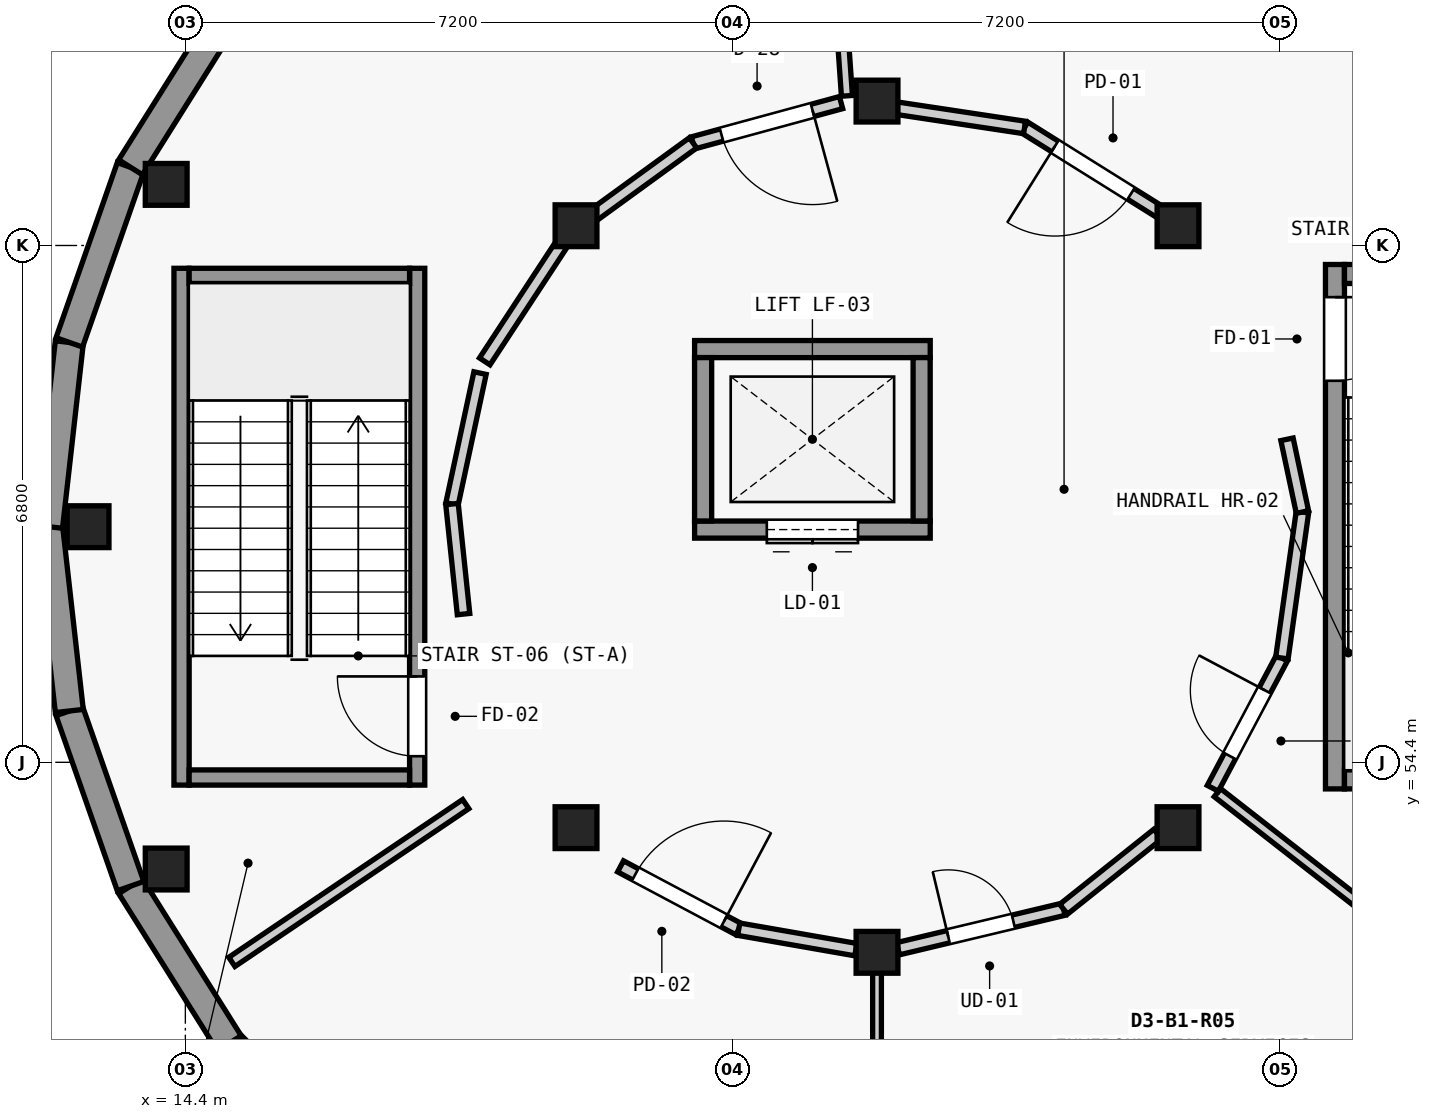
"""IFC4 building model, lengths in metres.
Left out: names, types, materials, properties, quantities, classifications, styles, units other than length and angle.
Written with IfcOpenShell. Run it as: python <this file> out.ifc"""

import sys

from ifc_helpers import new_model, si_unit, direction, frame, frame_2d, origin, origin_2d, place, context, subcontext, project, spatial, rectangle, extrude, element, fill, save


model = new_model("IFC4")
c1 = context("Model", 3, precision=1e-05, world=origin(), true_north=direction((0.0, 1.0)))
c2 = subcontext(c1, "Body", "Model", "MODEL_VIEW")
j1 = project(units=[si_unit("LENGTHUNIT", "METRE"), si_unit("PLANEANGLEUNIT", "RADIAN")], contexts=[c1])
p1 = place(None, origin())
s1 = spatial("IfcSite", under=j1, at=p1, CompositionType="ELEMENT")
p2 = place(p1, origin())
s2 = spatial("IfcBuilding", under=s1, at=p2, CompositionType="ELEMENT")
p3 = place(p2, frame((0.0, 0.0, -4.55)))
s3 = spatial("IfcBuildingStorey", under=s2, at=p3, CompositionType="ELEMENT", Elevation=-4.55)
for number, where, z_axis, x_axis in (
    (1, (14.148, 62.004, 0.0), (0.0, 0.0, 1.0), (1.0, 0.0, 0.0)),
    (2, (13.12, 57.5, 0.0), (0.0, 0.0, 1.0), (1.0, 0.0, 0.0)),
    (3, (14.148, 52.996, 0.0), (0.0, 0.0, 1.0), (1.0, 0.0, 0.0)),
    (4, (27.46, 61.46, 0.0), (0.0, 0.0, 1.0), (1.0, 0.0, 0.0)),
    (5, (23.5, 63.1, 0.0), (0.0, 0.0, 1.0), (1.0, 0.0, 0.0)),
    (6, (19.54, 61.46, 0.0), (0.0, 0.0, 1.0), (1.0, 0.0, 0.0)),
    (7, (19.54, 53.54, 0.0), (0.0, 0.0, 1.0), (1.0, 0.0, 0.0)),
    (8, (23.5, 51.9, 0.0), (0.0, 0.0, 1.0), (1.0, 0.0, 0.0)),
    (9, (27.46, 53.54, 0.0), (0.0, 0.0, 1.0), (1.0, 0.0, 0.0)),
):
    element("IfcColumn", number, at=place(p3, frame(where, z_axis=z_axis, x_axis=x_axis)), inside=s3, PredefinedType="COLUMN", context=c2, shape_type="SweptSolid", body=[
        extrude(rectangle(XDim=0.55, YDim=0.55, at=origin_2d()), origin(), (0.0, 0.0, 1.0), 4.55),
    ])
p4 = place(p3, frame((16.704, 48.978, 0.0), z_axis=(0.0, 0.0, 1.0), x_axis=(-0.707106781187, 0.707106781187, 0.0)))
e10 = element("IfcWall", 10, at=p4, inside=s3, PredefinedType="USERDEFINED", context=c2, shape_type="SweptSolid", body=[
    extrude(rectangle(XDim=2.441, YDim=0.37, at=frame_2d((1.22, 0.0))), origin(), (0.0, 0.0, 1.0), 3.335),
])
p5 = place(p3, frame((14.978, 50.704, 0.0), z_axis=(0.0, 0.0, 1.0), x_axis=(-0.532136726684, 0.846658434148, 0.0)))
e11 = element("IfcWall", 11, at=p5, inside=s3, PredefinedType="USERDEFINED", context=c2, shape_type="SweptSolid", body=[
    extrude(rectangle(XDim=2.441, YDim=0.37, at=frame_2d((1.221, 0.0))), origin(), (0.0, 0.0, 1.0), 3.335),
])
p6 = place(p3, frame((13.679, 52.771, 0.0), z_axis=(0.0, 0.0, 1.0), x_axis=(-0.330176659411, 0.943919156274, 0.0)))
e12 = element("IfcWall", 12, at=p6, inside=s3, PredefinedType="USERDEFINED", context=c2, shape_type="SweptSolid", body=[
    extrude(rectangle(XDim=2.441, YDim=0.37, at=frame_2d((1.22, 0.0))), origin(), (0.0, 0.0, 1.0), 3.335),
])
for number, where, z_axis, x_axis in (
    (13, (12.873, 55.075, 0.0), (0.0, 0.0, 1.0), (-0.112, 0.994, 0.0)),
    (14, (12.6, 57.5, 0.0), (0.0, 0.0, 1.0), (0.112, 0.994, 0.0)),
):
    element("IfcWall", number, at=place(p3, frame(where, z_axis=z_axis, x_axis=x_axis)), inside=s3, PredefinedType="USERDEFINED", context=c2, shape_type="SweptSolid", body=[
        extrude(rectangle(XDim=2.44, YDim=0.37, at=frame_2d((1.22, 0.0))), origin(), (0.0, 0.0, 1.0), 3.335),
    ])
p7 = place(p3, frame((12.873, 59.925, 0.0), z_axis=(0.0, 0.0, 1.0), x_axis=(0.330176659411, 0.943919156274, 0.0)))
e15 = element("IfcWall", 15, at=p7, inside=s3, PredefinedType="USERDEFINED", context=c2, shape_type="SweptSolid", body=[
    extrude(rectangle(XDim=2.441, YDim=0.37, at=frame_2d((1.22, 0.0))), origin(), (0.0, 0.0, 1.0), 3.335),
])
p8 = place(p3, frame((13.679, 62.229, 0.0), z_axis=(0.0, 0.0, 1.0), x_axis=(0.532136726684, 0.846658434148, 0.0)))
e16 = element("IfcWall", 16, at=p8, inside=s3, PredefinedType="USERDEFINED", context=c2, shape_type="SweptSolid", body=[
    extrude(rectangle(XDim=2.441, YDim=0.37, at=frame_2d((1.221, 0.0))), origin(), (0.0, 0.0, 1.0), 3.335),
])
p9 = place(p3, frame((29.525, 60.95, 0.0), z_axis=(0.0, 0.0, 1.0), x_axis=(0.0, -1.0, 0.0)))
e17 = element("IfcWall", 17, at=p9, inside=s3, PredefinedType="SHEAR", context=c2, shape_type="SweptSolid", body=[
    extrude(rectangle(XDim=6.9, YDim=0.25, at=frame_2d((3.45, 0.0))), origin(), (0.0, 0.0, 1.0), 4.135),
])
p10 = place(p9, frame((0.43, 0.0, 0.0)))
e18 = element("IfcOpeningElement", 18, at=p10, cuts=e17, PredefinedType="OPENING", context=c2, shape_type="SweptSolid", body=[
    extrude(rectangle(XDim=1.1, YDim=2.15, at=frame_2d((0.55, 1.075))), frame((0.0, 0.135, 0.0), z_axis=(0.0, -1.0, 0.0), x_axis=(1.0, 0.0, 0.0)), (0.0, 0.0, 1.0), 0.27),
])
for number, where, z_axis, x_axis in (
    (19, (29.65, 60.825, 0.0), (0.0, 0.0, 1.0), (1.0, 0.0, 0.0)),
    (20, (29.65, 54.175, 0.0), (0.0, 0.0, 1.0), (1.0, 0.0, 0.0)),
):
    element("IfcWall", number, at=place(p3, frame(where, z_axis=z_axis, x_axis=x_axis)), inside=s3, PredefinedType="SHEAR", context=c2, shape_type="SweptSolid", body=[
        extrude(rectangle(XDim=2.9, YDim=0.25, at=frame_2d((1.45, 0.0))), origin(), (0.0, 0.0, 1.0), 4.135),
    ])
p11 = place(p3, frame((17.45, 54.1, 0.0), z_axis=(0.0, 0.0, 1.0), x_axis=(0.0, 1.0, 0.0)))
e21 = element("IfcWall", 21, at=p11, inside=s3, PredefinedType="SHEAR", context=c2, shape_type="SweptSolid", body=[
    extrude(rectangle(XDim=6.8, YDim=0.2, at=frame_2d((3.4, 0.0))), origin(), (0.0, 0.0, 1.0), 4.135),
])
p12 = place(p11, frame((0.38, 0.0, 0.0)))
e22 = element("IfcOpeningElement", 22, at=p12, cuts=e21, PredefinedType="OPENING", context=c2, shape_type="SweptSolid", body=[
    extrude(rectangle(XDim=1.05, YDim=2.15, at=frame_2d((0.525, 1.075))), frame((0.0, 0.11, 0.0), z_axis=(0.0, -1.0, 0.0), x_axis=(1.0, 0.0, 0.0)), (0.0, 0.0, 1.0), 0.22),
])
p13 = place(p3, frame((14.35, 54.1, 0.0), z_axis=(0.0, 0.0, 1.0), x_axis=(0.0, 1.0, 0.0)))
e23 = element("IfcWall", 23, at=p13, inside=s3, PredefinedType="SHEAR", context=c2, shape_type="SweptSolid", body=[
    extrude(rectangle(XDim=6.8, YDim=0.2, at=frame_2d((3.4, 0.0))), origin(), (0.0, 0.0, 1.0), 4.135),
])
for number, where, z_axis, x_axis in (
    (24, (17.35, 54.2, 0.0), (0.0, 0.0, 1.0), (-1.0, 0.0, 0.0)),
    (25, (17.35, 60.8, 0.0), (0.0, 0.0, 1.0), (-1.0, 0.0, 0.0)),
):
    element("IfcWall", number, at=place(p3, frame(where, z_axis=z_axis, x_axis=x_axis)), inside=s3, PredefinedType="SHEAR", context=c2, shape_type="SweptSolid", body=[
        extrude(rectangle(XDim=2.9, YDim=0.2, at=frame_2d((1.45, 0.0))), origin(), (0.0, 0.0, 1.0), 4.135),
    ])
p14 = place(p3, frame((21.1, 57.462, 0.0), z_axis=(0.0, 0.0, 1.0), x_axis=(1.0, 0.0, 0.0)))
e26 = element("IfcWall", 26, at=p14, inside=s3, PredefinedType="SHEAR", context=c2, shape_type="SweptSolid", body=[
    extrude(rectangle(XDim=3.1, YDim=0.225, at=frame_2d((1.55, 0.0))), origin(), (0.0, 0.0, 1.0), 4.135),
])
p15 = place(p14, frame((0.95, 0.0, 0.0)))
e27 = element("IfcOpeningElement", 27, at=p15, cuts=e26, PredefinedType="OPENING", context=c2, shape_type="SweptSolid", body=[
    extrude(rectangle(XDim=1.2, YDim=2.2, at=frame_2d((0.6, 1.1))), frame((0.0, 0.123, 0.0), z_axis=(0.0, -1.0, 0.0), x_axis=(1.0, 0.0, 0.0)), (0.0, 0.0, 1.0), 0.245),
])
p16 = place(p3, frame((21.1, 59.837, 0.0), z_axis=(0.0, 0.0, 1.0), x_axis=(1.0, 0.0, 0.0)))
e28 = element("IfcWall", 28, at=p16, inside=s3, PredefinedType="SHEAR", context=c2, shape_type="SweptSolid", body=[
    extrude(rectangle(XDim=3.1, YDim=0.225, at=frame_2d((1.55, 0.0))), origin(), (0.0, 0.0, 1.0), 4.135),
])
for number, where, z_axis, x_axis in (
    (29, (21.212, 57.575, 0.0), (0.0, 0.0, 1.0), (0.0, 1.0, 0.0)),
    (30, (24.087, 57.575, 0.0), (0.0, 0.0, 1.0), (0.0, 1.0, 0.0)),
):
    element("IfcWall", number, at=place(p3, frame(where, z_axis=z_axis, x_axis=x_axis)), inside=s3, PredefinedType="SHEAR", context=c2, shape_type="SweptSolid", body=[
        extrude(rectangle(XDim=2.15, YDim=0.225, at=frame_2d((1.075, 0.0))), origin(), (0.0, 0.0, 1.0), 4.135),
    ])
p17 = place(p3, frame((23.104, 63.169, 0.0), z_axis=(0.0, 0.0, 1.0), x_axis=(-0.069759335413, 0.997563850148, 0.0)))
e31 = element("IfcWall", 31, at=p17, inside=s3, PredefinedType="PARTITIONING", context=c2, shape_type="SweptSolid", body=[
    extrude(rectangle(XDim=4.56, YDim=0.145, at=frame_2d((2.28, 0.0))), origin(), (0.0, 0.0, 1.0), 3.31),
])
p18 = place(p3, frame((18.089, 53.85, 0.0), z_axis=(0.0, 0.0, 1.0), x_axis=(-0.828961502122, -0.559305665982, 0.0)))
e32 = element("IfcWall", 32, at=p18, inside=s3, PredefinedType="PARTITIONING", context=c2, shape_type="SweptSolid", body=[
    extrude(rectangle(XDim=3.712, YDim=0.145, at=frame_2d((1.856, 0.0))), origin(), (0.0, 0.0, 1.0), 3.31),
])
p19 = place(p3, frame((23.5, 51.817, 0.0), z_axis=(0.0, 0.0, 1.0), x_axis=(0.0, -1.0, 0.0)))
e33 = element("IfcWall", 33, at=p19, inside=s3, PredefinedType="PARTITIONING", context=c2, shape_type="SweptSolid", body=[
    extrude(rectangle(XDim=4.615, YDim=0.115, at=frame_2d((2.308, 0.0))), origin(), (0.0, 0.0, 1.0), 3.31),
])
p20 = place(p3, frame((27.978, 54.001, 0.0), z_axis=(0.0, 0.0, 1.0), x_axis=(0.788037233831, -0.615627580681, 0.0)))
e34 = element("IfcWall", 34, at=p20, inside=s3, PredefinedType="PLUMBINGWALL", context=c2, shape_type="SweptSolid", body=[
    extrude(rectangle(XDim=4.605, YDim=0.135, at=frame_2d((2.302, 0.0))), origin(), (0.0, 0.0, 1.0), 3.31),
])
p21 = place(p3, frame((27.238, 61.63, 0.0), z_axis=(0.0, 0.0, 1.0), x_axis=(-0.848030663633, 0.529947161081, 0.0)))
e35 = element("IfcWall", 35, at=p21, inside=s3, PredefinedType="PARTITIONING", context=c2, shape_type="SweptSolid", body=[
    extrude(rectangle(XDim=2.119, YDim=0.165, at=frame_2d((1.06, 0.0))), origin(), (0.0, 0.0, 1.0), 3.31),
])
p22 = place(p21, frame((0.469, 0.0, 0.0)))
e36 = element("IfcOpeningElement", 36, at=p22, cuts=e35, PredefinedType="OPENING", context=c2, shape_type="SweptSolid", body=[
    extrude(rectangle(XDim=1.18, YDim=2.2, at=frame_2d((0.59, 1.1))), frame((0.0, 0.093, 0.0), z_axis=(0.0, -1.0, 0.0), x_axis=(1.0, 0.0, 0.0)), (0.0, 0.0, 1.0), 0.185),
])
p23 = place(p3, frame((25.441, 62.753, 0.0), z_axis=(0.0, 0.0, 1.0), x_axis=(-0.988808298797, 0.149191649331, 0.0)))
e37 = element("IfcWall", 37, at=p23, inside=s3, PredefinedType="PARTITIONING", context=c2, shape_type="SweptSolid", body=[
    extrude(rectangle(XDim=1.697, YDim=0.165, at=frame_2d((0.849, 0.0))), origin(), (0.0, 0.0, 1.0), 3.31),
])
p24 = place(p3, frame((23.027, 63.08, 0.0), z_axis=(0.0, 0.0, 1.0), x_axis=(-0.964919932979, -0.262544325667, 0.0)))
e38 = element("IfcWall", 38, at=p24, inside=s3, PredefinedType="PARTITIONING", context=c2, shape_type="SweptSolid", body=[
    extrude(rectangle(XDim=2.019, YDim=0.165, at=frame_2d((1.009, 0.0))), origin(), (0.0, 0.0, 1.0), 3.31),
])
p25 = place(p24, frame((0.389, 0.0, 0.0)))
e39 = element("IfcOpeningElement", 39, at=p25, cuts=e38, PredefinedType="OPENING", context=c2, shape_type="SweptSolid", body=[
    extrude(rectangle(XDim=1.24, YDim=2.22, at=frame_2d((0.62, 1.11))), frame((0.0, 0.093, 0.0), z_axis=(0.0, -1.0, 0.0), x_axis=(1.0, 0.0, 0.0)), (0.0, 0.0, 1.0), 0.185),
])
p26 = place(p3, frame((21.079, 62.55, 0.0), z_axis=(0.0, 0.0, 1.0), x_axis=(-0.808860869398, -0.588000079895, 0.0)))
e40 = element("IfcWall", 40, at=p26, inside=s3, PredefinedType="PARTITIONING", context=c2, shape_type="SweptSolid", body=[
    extrude(rectangle(XDim=1.607, YDim=0.165, at=frame_2d((0.804, 0.0))), origin(), (0.0, 0.0, 1.0), 3.31),
])
p27 = place(p3, frame((19.366, 61.241, 0.0), z_axis=(0.0, 0.0, 1.0), x_axis=(-0.548365930053, -0.836238486771, 0.0)))
e41 = element("IfcWall", 41, at=p27, inside=s3, PredefinedType="PARTITIONING", context=c2, shape_type="SweptSolid", body=[
    extrude(rectangle(XDim=1.873, YDim=0.165, at=frame_2d((0.936, 0.0))), origin(), (0.0, 0.0, 1.0), 3.31),
])
p28 = place(p3, frame((18.277, 59.521, 0.0), z_axis=(0.0, 0.0, 1.0), x_axis=(-0.209500701014, -0.977808496729, 0.0)))
e42 = element("IfcWall", 42, at=p28, inside=s3, PredefinedType="PARTITIONING", context=c2, shape_type="SweptSolid", body=[
    extrude(rectangle(XDim=1.762, YDim=0.165, at=frame_2d((0.881, 0.0))), origin(), (0.0, 0.0, 1.0), 3.31),
])
p29 = place(p3, frame((17.908, 57.798, 0.0), z_axis=(0.0, 0.0, 1.0), x_axis=(0.10446656428, -0.994528399267, 0.0)))
e43 = element("IfcWall", 43, at=p29, inside=s3, PredefinedType="PARTITIONING", context=c2, shape_type="SweptSolid", body=[
    extrude(rectangle(XDim=1.456, YDim=0.165, at=frame_2d((0.728, 0.0))), origin(), (0.0, 0.0, 1.0), 3.31),
])
p30 = place(p3, frame((20.126, 53.031, 0.0), z_axis=(0.0, 0.0, 1.0), x_axis=(0.882916409472, -0.469530205508, 0.0)))
e44 = element("IfcWall", 44, at=p30, inside=s3, PredefinedType="PARTITIONING", context=c2, shape_type="SweptSolid", body=[
    extrude(rectangle(XDim=1.761, YDim=0.165, at=frame_2d((0.881, 0.0))), origin(), (0.0, 0.0, 1.0), 3.31),
])
p31 = place(p30, frame((0.221, 0.0, 0.0)))
e45 = element("IfcOpeningElement", 45, at=p31, cuts=e44, PredefinedType="OPENING", context=c2, shape_type="SweptSolid", body=[
    extrude(rectangle(XDim=1.32, YDim=2.24, at=frame_2d((0.66, 1.12))), frame((0.0, 0.093, 0.0), z_axis=(0.0, -1.0, 0.0), x_axis=(1.0, 0.0, 0.0)), (0.0, 0.0, 1.0), 0.185),
])
p32 = place(p3, frame((21.681, 52.204, 0.0), z_axis=(0.0, 0.0, 1.0), x_axis=(0.985099289187, -0.171986599601, 0.0)))
e46 = element("IfcWall", 46, at=p32, inside=s3, PredefinedType="PARTITIONING", context=c2, shape_type="SweptSolid", body=[
    extrude(rectangle(XDim=1.564, YDim=0.165, at=frame_2d((0.782, 0.0))), origin(), (0.0, 0.0, 1.0), 3.31),
])
p33 = place(p3, frame((23.776, 51.947, 0.0), z_axis=(0.0, 0.0, 1.0), x_axis=(0.972689167377, 0.232111575903, 0.0)))
e47 = element("IfcWall", 47, at=p33, inside=s3, PredefinedType="PARTITIONING", context=c2, shape_type="SweptSolid", body=[
    extrude(rectangle(XDim=2.24, YDim=0.165, at=frame_2d((1.12, 0.0))), origin(), (0.0, 0.0, 1.0), 3.31),
])
p34 = place(p33, frame((0.68, 0.0, 0.0)))
e48 = element("IfcOpeningElement", 48, at=p34, cuts=e47, PredefinedType="OPENING", context=c2, shape_type="SweptSolid", body=[
    extrude(rectangle(XDim=0.88, YDim=2.1, at=frame_2d((0.44, 1.05))), frame((0.0, 0.093, 0.0), z_axis=(0.0, -1.0, 0.0), x_axis=(1.0, 0.0, 0.0)), (0.0, 0.0, 1.0), 0.185),
])
p35 = place(p3, frame((25.955, 52.467, 0.0), z_axis=(0.0, 0.0, 1.0), x_axis=(0.781844808281, 0.623473091451, 0.0)))
e49 = element("IfcWall", 49, at=p35, inside=s3, PredefinedType="PARTITIONING", context=c2, shape_type="SweptSolid", body=[
    extrude(rectangle(XDim=1.585, YDim=0.165, at=frame_2d((0.792, 0.0))), origin(), (0.0, 0.0, 1.0), 3.31),
])
p36 = place(p3, frame((27.918, 54.058, 0.0), z_axis=(0.0, 0.0, 1.0), x_axis=(0.46852941816, 0.883447895644, 0.0)))
e50 = element("IfcWall", 50, at=p36, inside=s3, PredefinedType="PARTITIONING", context=c2, shape_type="SweptSolid", body=[
    extrude(rectangle(XDim=1.94, YDim=0.165, at=frame_2d((0.97, 0.0))), origin(), (0.0, 0.0, 1.0), 3.31),
])
p37 = place(p36, frame((0.48, 0.0, 0.0)))
e51 = element("IfcOpeningElement", 51, at=p37, cuts=e50, PredefinedType="OPENING", context=c2, shape_type="SweptSolid", body=[
    extrude(rectangle(XDim=0.98, YDim=2.1, at=frame_2d((0.49, 1.05))), frame((0.0, 0.093, 0.0), z_axis=(0.0, -1.0, 0.0), x_axis=(1.0, 0.0, 0.0)), (0.0, 0.0, 1.0), 0.185),
])
p38 = place(p3, frame((28.827, 55.772, 0.0), z_axis=(0.0, 0.0, 1.0), x_axis=(0.139183488293, 0.990266608842, 0.0)))
e52 = element("IfcWall", 52, at=p38, inside=s3, PredefinedType="PARTITIONING", context=c2, shape_type="SweptSolid", body=[
    extrude(rectangle(XDim=1.94, YDim=0.165, at=frame_2d((0.97, 0.0))), origin(), (0.0, 0.0, 1.0), 3.31),
])
p39 = place(p3, frame((29.097, 57.693, 0.0), z_axis=(0.0, 0.0, 1.0), x_axis=(-0.20743182321, 0.978249476729, 0.0)))
e53 = element("IfcWall", 53, at=p39, inside=s3, PredefinedType="PARTITIONING", context=c2, shape_type="SweptSolid", body=[
    extrude(rectangle(XDim=0.978, YDim=0.165, at=frame_2d((0.489, 0.0))), origin(), (0.0, 0.0, 1.0), 3.31),
])
p40 = place(p10, origin())
e54 = element("IfcDoor", 54, at=p40, inside=s3, OperationType="SINGLE_SWING_LEFT", PredefinedType="DOOR", context=c2, shape_type="SweptSolid", body=[
    extrude(rectangle(XDim=1.1, YDim=2.15, at=frame_2d((0.55, 1.075))), frame((0.0, 0.025, 0.0), z_axis=(0.0, -1.0, 0.0), x_axis=(1.0, 0.0, 0.0)), (0.0, 0.0, 1.0), 0.05),
])
fill(e18, e54)
p41 = place(p12, origin())
e55 = element("IfcDoor", 55, at=p41, inside=s3, OperationType="SINGLE_SWING_RIGHT", PredefinedType="DOOR", context=c2, shape_type="SweptSolid", body=[
    extrude(rectangle(XDim=1.05, YDim=2.15, at=frame_2d((0.525, 1.075))), frame((0.0, 0.025, 0.0), z_axis=(0.0, -1.0, 0.0), x_axis=(1.0, 0.0, 0.0)), (0.0, 0.0, 1.0), 0.05),
])
fill(e22, e55)
p42 = place(p15, origin())
e56 = element("IfcDoor", 56, at=p42, inside=s3, OperationType="DOUBLE_DOOR_SLIDING", PredefinedType="DOOR", context=c2, shape_type="SweptSolid", body=[
    extrude(rectangle(XDim=1.2, YDim=2.2, at=frame_2d((0.6, 1.1))), frame((0.0, 0.025, 0.0), z_axis=(0.0, -1.0, 0.0), x_axis=(1.0, 0.0, 0.0)), (0.0, 0.0, 1.0), 0.05),
])
fill(e27, e56)
p43 = place(p22, origin())
e57 = element("IfcDoor", 57, at=p43, inside=s3, OperationType="SINGLE_SWING_RIGHT", PredefinedType="DOOR", context=c2, shape_type="SweptSolid", body=[
    extrude(rectangle(XDim=1.18, YDim=2.2, at=frame_2d((0.59, 1.1))), frame((0.0, 0.025, 0.0), z_axis=(0.0, -1.0, 0.0), x_axis=(1.0, 0.0, 0.0)), (0.0, 0.0, 1.0), 0.05),
])
fill(e36, e57)
p44 = place(p25, origin())
e58 = element("IfcDoor", 58, at=p44, inside=s3, OperationType="SINGLE_SWING_LEFT", PredefinedType="DOOR", context=c2, shape_type="SweptSolid", body=[
    extrude(rectangle(XDim=1.24, YDim=2.22, at=frame_2d((0.62, 1.11))), frame((0.0, 0.025, 0.0), z_axis=(0.0, -1.0, 0.0), x_axis=(1.0, 0.0, 0.0)), (0.0, 0.0, 1.0), 0.05),
])
fill(e39, e58)
p45 = place(p31, origin())
e59 = element("IfcDoor", 59, at=p45, inside=s3, OperationType="SINGLE_SWING_RIGHT", PredefinedType="DOOR", context=c2, shape_type="SweptSolid", body=[
    extrude(rectangle(XDim=1.32, YDim=2.24, at=frame_2d((0.66, 1.12))), frame((0.0, 0.025, 0.0), z_axis=(0.0, -1.0, 0.0), x_axis=(1.0, 0.0, 0.0)), (0.0, 0.0, 1.0), 0.05),
])
fill(e45, e59)
p46 = place(p34, origin())
e60 = element("IfcDoor", 60, at=p46, inside=s3, OperationType="SINGLE_SWING_LEFT", PredefinedType="DOOR", context=c2, shape_type="SweptSolid", body=[
    extrude(rectangle(XDim=0.88, YDim=2.1, at=frame_2d((0.44, 1.05))), frame((0.0, 0.025, 0.0), z_axis=(0.0, -1.0, 0.0), x_axis=(1.0, 0.0, 0.0)), (0.0, 0.0, 1.0), 0.05),
])
fill(e48, e60)
p47 = place(p37, origin())
e61 = element("IfcDoor", 61, at=p47, inside=s3, OperationType="SINGLE_SWING_RIGHT", PredefinedType="DOOR", context=c2, shape_type="SweptSolid", body=[
    extrude(rectangle(XDim=0.98, YDim=2.1, at=frame_2d((0.49, 1.05))), frame((0.0, 0.025, 0.0), z_axis=(0.0, -1.0, 0.0), x_axis=(1.0, 0.0, 0.0)), (0.0, 0.0, 1.0), 0.05),
])
fill(e51, e61)
save(model, sys.argv[1])
